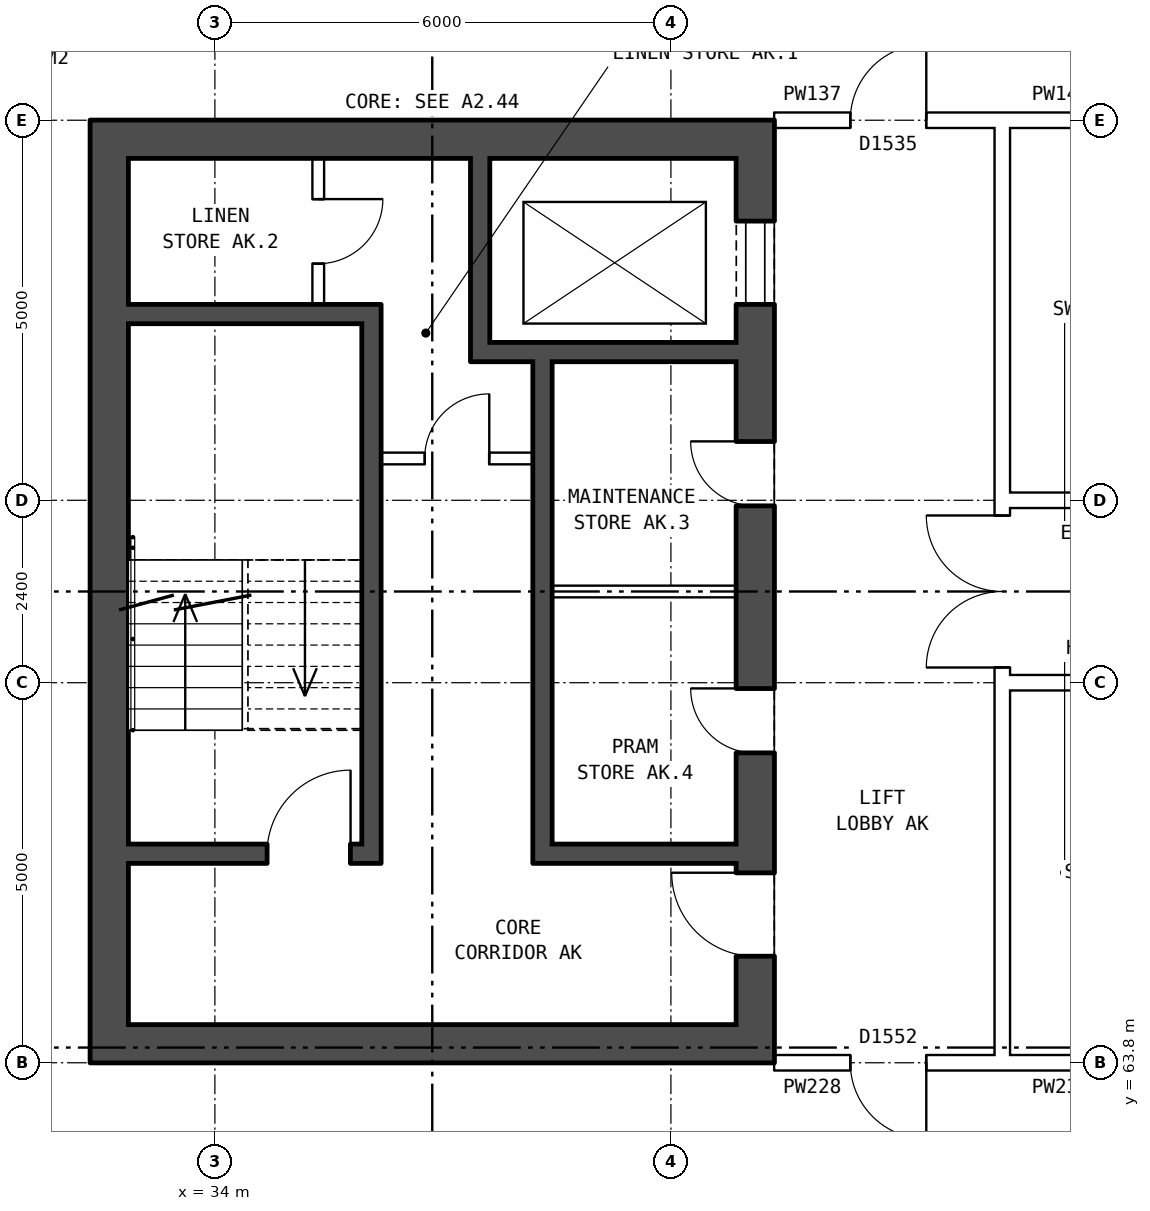
"""IFC4 building model, lengths in metres.
Left out: names, types, materials, properties, quantities, classifications, styles, units other than length and angle.
Written with IfcOpenShell. Run it as: python <this file> out.ifc"""

import sys

from ifc_helpers import new_model, si_unit, direction, frame, frame_2d, origin, place, context, subcontext, project, spatial, rectangle, extrude, element, fill, save


model = new_model("IFC4")
c1 = context("Model", 3, precision=1e-05, world=origin(), true_north=direction((0.0, 1.0)))
c2 = subcontext(c1, "Body", "Model", "MODEL_VIEW")
j1 = project(units=[si_unit("LENGTHUNIT", "METRE"), si_unit("PLANEANGLEUNIT", "RADIAN")], contexts=[c1])
p1 = place(None, origin())
s1 = spatial("IfcSite", under=j1, at=p1, CompositionType="ELEMENT")
p2 = place(p1, origin())
s2 = spatial("IfcBuilding", under=s1, at=p2, CompositionType="ELEMENT")
p3 = place(p2, frame((0.0, 0.0, 154.7)))
s3 = spatial("IfcBuildingStorey", under=s2, at=p3, CompositionType="ELEMENT", Elevation=154.7)
p4 = place(p3, frame((41.11, 76.2, 0.0), z_axis=(0.0, 0.0, 1.0), x_axis=(0.0, -1.0, 0.0)))
e1 = element("IfcWall", 1, at=p4, inside=s3, PredefinedType="SHEAR", context=c2, shape_type="SweptSolid", body=[
    extrude(rectangle(XDim=12.4, YDim=0.5, at=frame_2d((6.2, 0.0))), origin(), (0.0, 0.0, 1.0), 2.85),
])
p5 = place(p4, frame((1.325, 0.0, 0.0)))
e2 = element("IfcOpeningElement", 2, at=p5, cuts=e1, PredefinedType="OPENING", context=c2, shape_type="SweptSolid", body=[
    extrude(rectangle(XDim=1.1, YDim=2.1, at=frame_2d((0.55, 1.05))), frame((0.0, 0.26, 0.0), z_axis=(0.0, -1.0, 0.0), x_axis=(1.0, 0.0, 0.0)), (0.0, 0.0, 1.0), 0.52),
])
p6 = place(p4, frame((4.225, 0.0, 0.0)))
e3 = element("IfcOpeningElement", 3, at=p6, cuts=e1, PredefinedType="OPENING", context=c2, shape_type="SweptSolid", body=[
    extrude(rectangle(XDim=0.85, YDim=2.1, at=frame_2d((0.425, 1.05))), frame((0.0, 0.26, 0.0), z_axis=(0.0, -1.0, 0.0), x_axis=(1.0, 0.0, 0.0)), (0.0, 0.0, 1.0), 0.52),
])
p7 = place(p4, frame((7.475, 0.0, 0.0)))
e4 = element("IfcOpeningElement", 4, at=p7, cuts=e1, PredefinedType="OPENING", context=c2, shape_type="SweptSolid", body=[
    extrude(rectangle(XDim=0.85, YDim=2.1, at=frame_2d((0.425, 1.05))), frame((0.0, 0.26, 0.0), z_axis=(0.0, -1.0, 0.0), x_axis=(1.0, 0.0, 0.0)), (0.0, 0.0, 1.0), 0.52),
])
p8 = place(p4, frame((9.9, 0.0, 0.0)))
e5 = element("IfcOpeningElement", 5, at=p8, cuts=e1, PredefinedType="OPENING", context=c2, shape_type="SweptSolid", body=[
    extrude(rectangle(XDim=1.1, YDim=2.1, at=frame_2d((0.55, 1.05))), frame((0.0, 0.26, 0.0), z_axis=(0.0, -1.0, 0.0), x_axis=(1.0, 0.0, 0.0)), (0.0, 0.0, 1.0), 0.52),
])
p9 = place(p3, frame((32.61, 76.2, 0.0), z_axis=(0.0, 0.0, 1.0), x_axis=(0.0, -1.0, 0.0)))
e6 = element("IfcWall", 6, at=p9, inside=s3, PredefinedType="SHEAR", context=c2, shape_type="SweptSolid", body=[
    extrude(rectangle(XDim=12.4, YDim=0.5, at=frame_2d((6.2, 0.0))), origin(), (0.0, 0.0, 1.0), 2.85),
])
for number, where, z_axis, x_axis in (
    (7, (40.86, 75.95, 0.0), (0.0, 0.0, 1.0), (-1.0, 0.0, 0.0)),
    (8, (40.86, 64.05, 0.0), (0.0, 0.0, 1.0), (-1.0, 0.0, 0.0)),
):
    element("IfcWall", number, at=place(p3, frame(where, z_axis=z_axis, x_axis=x_axis)), inside=s3, PredefinedType="SHEAR", context=c2, shape_type="SweptSolid", body=[
        extrude(rectangle(XDim=8.0, YDim=0.5, at=frame_2d((4.0, 0.0))), origin(), (0.0, 0.0, 1.0), 2.85),
    ])
p10 = place(p3, frame((35.935, 73.65, 0.0), z_axis=(0.0, 0.0, 1.0), x_axis=(-1.0, 0.0, 0.0)))
e9 = element("IfcWall", 9, at=p10, inside=s3, PredefinedType="SHEAR", context=c2, shape_type="SweptSolid", body=[
    extrude(rectangle(XDim=3.075, YDim=0.25, at=frame_2d((1.538, 0.0))), origin(), (0.0, 0.0, 1.0), 2.85),
])
p11 = place(p3, frame((40.86, 73.15, 0.0), z_axis=(0.0, 0.0, 1.0), x_axis=(-1.0, 0.0, 0.0)))
e10 = element("IfcWall", 10, at=p11, inside=s3, PredefinedType="SHEAR", context=c2, shape_type="SweptSolid", body=[
    extrude(rectangle(XDim=3.495, YDim=0.25, at=frame_2d((1.748, 0.0))), origin(), (0.0, 0.0, 1.0), 2.85),
])
p12 = place(p3, frame((38.185, 71.75, 0.0), z_axis=(0.0, 0.0, 1.0), x_axis=(-1.0, 0.0, 0.0)))
e11 = element("IfcWall", 11, at=p12, inside=s3, PredefinedType="PARTITIONING", context=c2, shape_type="SweptSolid", body=[
    extrude(rectangle(XDim=2.0, YDim=0.15, at=frame_2d((1.0, 0.0))), origin(), (0.0, 0.0, 1.0), 2.85),
])
p13 = place(p12, frame((0.575, 0.0, 0.0)))
e12 = element("IfcOpeningElement", 12, at=p13, cuts=e11, PredefinedType="OPENING", context=c2, shape_type="SweptSolid", body=[
    extrude(rectangle(XDim=0.85, YDim=2.1, at=frame_2d((0.425, 1.05))), frame((0.0, 0.085, 0.0), z_axis=(0.0, -1.0, 0.0), x_axis=(1.0, 0.0, 0.0)), (0.0, 0.0, 1.0), 0.17),
])
p14 = place(p3, frame((40.86, 70.0, 0.0), z_axis=(0.0, 0.0, 1.0), x_axis=(-1.0, 0.0, 0.0)))
e13 = element("IfcWall", 13, at=p14, inside=s3, PredefinedType="PARTITIONING", context=c2, shape_type="SweptSolid", body=[
    extrude(rectangle(XDim=2.425, YDim=0.15, at=frame_2d((1.212, 0.0))), origin(), (0.0, 0.0, 1.0), 2.85),
])
p15 = place(p3, frame((40.86, 66.55, 0.0), z_axis=(0.0, 0.0, 1.0), x_axis=(-1.0, 0.0, 0.0)))
e14 = element("IfcWall", 14, at=p15, inside=s3, PredefinedType="SHEAR", context=c2, shape_type="SweptSolid", body=[
    extrude(rectangle(XDim=2.425, YDim=0.25, at=frame_2d((1.212, 0.0))), origin(), (0.0, 0.0, 1.0), 2.85),
])
p16 = place(p3, frame((35.935, 66.55, 0.0), z_axis=(0.0, 0.0, 1.0), x_axis=(-1.0, 0.0, 0.0)))
e15 = element("IfcWall", 15, at=p16, inside=s3, PredefinedType="SHEAR", context=c2, shape_type="SweptSolid", body=[
    extrude(rectangle(XDim=3.075, YDim=0.25, at=frame_2d((1.538, 0.0))), origin(), (0.0, 0.0, 1.0), 2.85),
])
p17 = place(p16, frame((0.15, 0.0, 0.0)))
e16 = element("IfcOpeningElement", 16, at=p17, cuts=e15, PredefinedType="OPENING", context=c2, shape_type="SweptSolid", body=[
    extrude(rectangle(XDim=1.1, YDim=2.1, at=frame_2d((0.55, 1.05))), frame((0.0, 0.135, 0.0), z_axis=(0.0, -1.0, 0.0), x_axis=(1.0, 0.0, 0.0)), (0.0, 0.0, 1.0), 0.27),
])
p18 = place(p3, frame((38.31, 73.025, 0.0), z_axis=(0.0, 0.0, 1.0), x_axis=(0.0, -1.0, 0.0)))
e17 = element("IfcWall", 17, at=p18, inside=s3, PredefinedType="SHEAR", context=c2, shape_type="SweptSolid", body=[
    extrude(rectangle(XDim=6.6, YDim=0.25, at=frame_2d((3.3, 0.0))), origin(), (0.0, 0.0, 1.0), 2.85),
])
p19 = place(p3, frame((37.49, 75.7, 0.0), z_axis=(0.0, 0.0, 1.0), x_axis=(0.0, -1.0, 0.0)))
e18 = element("IfcWall", 18, at=p19, inside=s3, PredefinedType="SHEAR", context=c2, shape_type="SweptSolid", body=[
    extrude(rectangle(XDim=2.425, YDim=0.25, at=frame_2d((1.212, 0.0))), origin(), (0.0, 0.0, 1.0), 2.85),
])
p20 = place(p3, frame((36.06, 73.775, 0.0), z_axis=(0.0, 0.0, 1.0), x_axis=(0.0, -1.0, 0.0)))
e19 = element("IfcWall", 19, at=p20, inside=s3, PredefinedType="SHEAR", context=c2, shape_type="SweptSolid", body=[
    extrude(rectangle(XDim=7.35, YDim=0.25, at=frame_2d((3.675, 0.0))), origin(), (0.0, 0.0, 1.0), 2.85),
])
p21 = place(p3, frame((35.36, 75.7, 0.0), z_axis=(0.0, 0.0, 1.0), x_axis=(0.0, -1.0, 0.0)))
e20 = element("IfcWall", 20, at=p21, inside=s3, PredefinedType="PARTITIONING", context=c2, shape_type="SweptSolid", body=[
    extrude(rectangle(XDim=1.925, YDim=0.15, at=frame_2d((0.962, 0.0))), origin(), (0.0, 0.0, 1.0), 2.85),
])
p22 = place(p21, frame((0.538, 0.0, 0.0)))
e21 = element("IfcOpeningElement", 21, at=p22, cuts=e20, PredefinedType="OPENING", context=c2, shape_type="SweptSolid", body=[
    extrude(rectangle(XDim=0.85, YDim=2.1, at=frame_2d((0.425, 1.05))), frame((0.0, 0.085, 0.0), z_axis=(0.0, -1.0, 0.0), x_axis=(1.0, 0.0, 0.0)), (0.0, 0.0, 1.0), 0.17),
])
p23 = place(p3, frame((44.36, 63.9, 0.0), z_axis=(0.0, 0.0, 1.0), x_axis=(0.0, 1.0, 0.0)))
e22 = element("IfcWall", 22, at=p23, inside=s3, PredefinedType="PARTITIONING", context=c2, shape_type="SweptSolid", body=[
    extrude(rectangle(XDim=12.2, YDim=0.2, at=frame_2d((6.1, 0.0))), origin(), (0.0, 0.0, 1.0), 2.85),
])
p24 = place(p23, frame((5.1, 0.0, 0.0)))
e23 = element("IfcOpeningElement", 23, at=p24, cuts=e22, PredefinedType="OPENING", context=c2, shape_type="SweptSolid", body=[
    extrude(rectangle(XDim=2.0, YDim=2.1, at=frame_2d((1.0, 1.05))), frame((0.0, 0.11, 0.0), z_axis=(0.0, -1.0, 0.0), x_axis=(1.0, 0.0, 0.0)), (0.0, 0.0, 1.0), 0.22),
])
p25 = place(p3, frame((41.36, 63.8, 0.0), z_axis=(0.0, 0.0, 1.0), x_axis=(1.0, 0.0, 0.0)))
e24 = element("IfcWall", 24, at=p25, inside=s3, PredefinedType="PARTITIONING", context=c2, shape_type="SweptSolid", body=[
    extrude(rectangle(XDim=3.0, YDim=0.2, at=frame_2d((1.5, 0.0))), origin(), (0.0, 0.0, 1.0), 2.85),
])
p26 = place(p25, frame((1.0, 0.0, 0.0)))
e25 = element("IfcOpeningElement", 25, at=p26, cuts=e24, PredefinedType="OPENING", context=c2, shape_type="SweptSolid", body=[
    extrude(rectangle(XDim=1.0, YDim=2.1, at=frame_2d((0.5, 1.05))), frame((0.0, 0.11, 0.0), z_axis=(0.0, -1.0, 0.0), x_axis=(1.0, 0.0, 0.0)), (0.0, 0.0, 1.0), 0.22),
])
p27 = place(p3, frame((44.36, 63.8, 0.0), z_axis=(0.0, 0.0, 1.0), x_axis=(1.0, 0.0, 0.0)))
e26 = element("IfcWall", 26, at=p27, inside=s3, PredefinedType="PARTITIONING", context=c2, shape_type="SweptSolid", body=[
    extrude(rectangle(XDim=1.54, YDim=0.2, at=frame_2d((0.77, 0.0))), origin(), (0.0, 0.0, 1.0), 2.85),
])
p28 = place(p3, frame((44.36, 68.8, 0.0), z_axis=(0.0, 0.0, 1.0), x_axis=(1.0, 0.0, 0.0)))
e27 = element("IfcWall", 27, at=p28, inside=s3, PredefinedType="PARTITIONING", context=c2, shape_type="SweptSolid", body=[
    extrude(rectangle(XDim=19.28, YDim=0.2, at=frame_2d((9.64, 0.0))), origin(), (0.0, 0.0, 1.0), 2.85),
])
p29 = place(p28, frame((14.64, 0.0, 0.0)))
e28 = element("IfcOpeningElement", 28, at=p29, cuts=e27, PredefinedType="OPENING", context=c2, shape_type="SweptSolid", body=[
    extrude(rectangle(XDim=1.0, YDim=2.1, at=frame_2d((0.5, 1.05))), frame((0.0, 0.11, 0.0), z_axis=(0.0, -1.0, 0.0), x_axis=(1.0, 0.0, 0.0)), (0.0, 0.0, 1.0), 0.22),
])
p30 = place(p28, frame((5.64, 0.0, 0.0)))
e29 = element("IfcOpeningElement", 29, at=p30, cuts=e27, PredefinedType="OPENING", context=c2, shape_type="SweptSolid", body=[
    extrude(rectangle(XDim=1.0, YDim=2.1, at=frame_2d((0.5, 1.05))), frame((0.0, 0.11, 0.0), z_axis=(0.0, -1.0, 0.0), x_axis=(1.0, 0.0, 0.0)), (0.0, 0.0, 1.0), 0.22),
])
p31 = place(p3, frame((44.36, 71.2, 0.0), z_axis=(0.0, 0.0, 1.0), x_axis=(1.0, 0.0, 0.0)))
e30 = element("IfcWall", 30, at=p31, inside=s3, PredefinedType="PARTITIONING", context=c2, shape_type="SweptSolid", body=[
    extrude(rectangle(XDim=19.28, YDim=0.2, at=frame_2d((9.64, 0.0))), origin(), (0.0, 0.0, 1.0), 2.85),
])
p32 = place(p31, frame((14.64, 0.0, 0.0)))
e31 = element("IfcOpeningElement", 31, at=p32, cuts=e30, PredefinedType="OPENING", context=c2, shape_type="SweptSolid", body=[
    extrude(rectangle(XDim=1.0, YDim=2.1, at=frame_2d((0.5, 1.05))), frame((0.0, 0.11, 0.0), z_axis=(0.0, -1.0, 0.0), x_axis=(1.0, 0.0, 0.0)), (0.0, 0.0, 1.0), 0.22),
])
p33 = place(p31, frame((5.64, 0.0, 0.0)))
e32 = element("IfcOpeningElement", 32, at=p33, cuts=e30, PredefinedType="OPENING", context=c2, shape_type="SweptSolid", body=[
    extrude(rectangle(XDim=1.0, YDim=2.1, at=frame_2d((0.5, 1.05))), frame((0.0, 0.11, 0.0), z_axis=(0.0, -1.0, 0.0), x_axis=(1.0, 0.0, 0.0)), (0.0, 0.0, 1.0), 0.22),
])
p34 = place(p3, frame((41.36, 76.2, 0.0), z_axis=(0.0, 0.0, 1.0), x_axis=(1.0, 0.0, 0.0)))
e33 = element("IfcWall", 33, at=p34, inside=s3, PredefinedType="PARTITIONING", context=c2, shape_type="SweptSolid", body=[
    extrude(rectangle(XDim=3.0, YDim=0.2, at=frame_2d((1.5, 0.0))), origin(), (0.0, 0.0, 1.0), 2.85),
])
p35 = place(p34, frame((1.0, 0.0, 0.0)))
e34 = element("IfcOpeningElement", 34, at=p35, cuts=e33, PredefinedType="OPENING", context=c2, shape_type="SweptSolid", body=[
    extrude(rectangle(XDim=1.0, YDim=2.1, at=frame_2d((0.5, 1.05))), frame((0.0, 0.11, 0.0), z_axis=(0.0, -1.0, 0.0), x_axis=(1.0, 0.0, 0.0)), (0.0, 0.0, 1.0), 0.22),
])
p36 = place(p3, frame((44.36, 76.2, 0.0), z_axis=(0.0, 0.0, 1.0), x_axis=(1.0, 0.0, 0.0)))
e35 = element("IfcWall", 35, at=p36, inside=s3, PredefinedType="PARTITIONING", context=c2, shape_type="SweptSolid", body=[
    extrude(rectangle(XDim=1.54, YDim=0.2, at=frame_2d((0.77, 0.0))), origin(), (0.0, 0.0, 1.0), 2.85),
])
p37 = place(p5, origin())
e36 = element("IfcDoor", 36, at=p37, inside=s3, OperationType="DOUBLE_DOOR_SLIDING", PredefinedType="DOOR", context=c2, shape_type="SweptSolid", body=[
    extrude(rectangle(XDim=1.1, YDim=2.1, at=frame_2d((0.55, 1.05))), frame((0.0, -0.185, 0.0), z_axis=(0.0, -1.0, 0.0), x_axis=(1.0, 0.0, 0.0)), (0.0, 0.0, 1.0), 0.05),
])
fill(e2, e36)
p38 = place(p6, frame((0.85, 0.0, 0.0), z_axis=(0.0, 0.0, 1.0), x_axis=(-1.0, 0.0, 0.0)))
e37 = element("IfcDoor", 37, at=p38, inside=s3, OperationType="SINGLE_SWING_RIGHT", PredefinedType="DOOR", context=c2, shape_type="SweptSolid", body=[
    extrude(rectangle(XDim=0.85, YDim=2.1, at=frame_2d((0.425, 1.05))), frame((0.0, 0.235, 0.0), z_axis=(0.0, -1.0, 0.0), x_axis=(1.0, 0.0, 0.0)), (0.0, 0.0, 1.0), 0.05),
])
fill(e3, e37)
p39 = place(p7, frame((0.85, 0.0, 0.0), z_axis=(0.0, 0.0, 1.0), x_axis=(-1.0, 0.0, 0.0)))
e38 = element("IfcDoor", 38, at=p39, inside=s3, OperationType="SINGLE_SWING_RIGHT", PredefinedType="DOOR", context=c2, shape_type="SweptSolid", body=[
    extrude(rectangle(XDim=0.85, YDim=2.1, at=frame_2d((0.425, 1.05))), frame((0.0, 0.235, 0.0), z_axis=(0.0, -1.0, 0.0), x_axis=(1.0, 0.0, 0.0)), (0.0, 0.0, 1.0), 0.05),
])
fill(e4, e38)
p40 = place(p8, frame((1.1, 0.0, 0.0), z_axis=(0.0, 0.0, 1.0), x_axis=(-1.0, 0.0, 0.0)))
e39 = element("IfcDoor", 39, at=p40, inside=s3, OperationType="SINGLE_SWING_RIGHT", PredefinedType="DOOR", context=c2, shape_type="SweptSolid", body=[
    extrude(rectangle(XDim=1.1, YDim=2.1, at=frame_2d((0.55, 1.05))), frame((0.0, 0.235, 0.0), z_axis=(0.0, -1.0, 0.0), x_axis=(1.0, 0.0, 0.0)), (0.0, 0.0, 1.0), 0.05),
])
fill(e5, e39)
p41 = place(p17, frame((1.1, 0.0, 0.0), z_axis=(0.0, 0.0, 1.0), x_axis=(-1.0, 0.0, 0.0)))
e40 = element("IfcDoor", 40, at=p41, inside=s3, OperationType="SINGLE_SWING_RIGHT", PredefinedType="DOOR", context=c2, shape_type="SweptSolid", body=[
    extrude(rectangle(XDim=1.1, YDim=2.1, at=frame_2d((0.55, 1.05))), frame((0.0, 0.025, 0.0), z_axis=(0.0, -1.0, 0.0), x_axis=(1.0, 0.0, 0.0)), (0.0, 0.0, 1.0), 0.05),
])
fill(e16, e40)
p42 = place(p13, frame((0.85, 0.0, 0.0), z_axis=(0.0, 0.0, 1.0), x_axis=(-1.0, 0.0, 0.0)))
e41 = element("IfcDoor", 41, at=p42, inside=s3, OperationType="SINGLE_SWING_RIGHT", PredefinedType="DOOR", context=c2, shape_type="SweptSolid", body=[
    extrude(rectangle(XDim=0.85, YDim=2.1, at=frame_2d((0.425, 1.05))), frame((0.0, 0.025, 0.0), z_axis=(0.0, -1.0, 0.0), x_axis=(1.0, 0.0, 0.0)), (0.0, 0.0, 1.0), 0.05),
])
fill(e12, e41)
p43 = place(p22, origin())
e42 = element("IfcDoor", 42, at=p43, inside=s3, OperationType="SINGLE_SWING_LEFT", PredefinedType="DOOR", context=c2, shape_type="SweptSolid", body=[
    extrude(rectangle(XDim=0.85, YDim=2.1, at=frame_2d((0.425, 1.05))), frame((0.0, 0.025, 0.0), z_axis=(0.0, -1.0, 0.0), x_axis=(1.0, 0.0, 0.0)), (0.0, 0.0, 1.0), 0.05),
])
fill(e21, e42)
p44 = place(p24, origin())
e43 = element("IfcDoor", 43, at=p44, inside=s3, OperationType="DOUBLE_DOOR_SINGLE_SWING", PredefinedType="DOOR", context=c2, shape_type="SweptSolid", body=[
    extrude(rectangle(XDim=2.0, YDim=2.1, at=frame_2d((1.0, 1.05))), frame((0.0, 0.025, 0.0), z_axis=(0.0, -1.0, 0.0), x_axis=(1.0, 0.0, 0.0)), (0.0, 0.0, 1.0), 0.05),
])
fill(e23, e43)
p45 = place(p26, frame((1.0, 0.0, 0.0), z_axis=(0.0, 0.0, 1.0), x_axis=(-1.0, 0.0, 0.0)))
e44 = element("IfcDoor", 44, at=p45, inside=s3, OperationType="SINGLE_SWING_LEFT", PredefinedType="DOOR", context=c2, shape_type="SweptSolid", body=[
    extrude(rectangle(XDim=1.0, YDim=2.1, at=frame_2d((0.5, 1.05))), frame((0.0, 0.025, 0.0), z_axis=(0.0, -1.0, 0.0), x_axis=(1.0, 0.0, 0.0)), (0.0, 0.0, 1.0), 0.05),
])
fill(e25, e44)
p46 = place(p35, origin())
e45 = element("IfcDoor", 45, at=p46, inside=s3, OperationType="SINGLE_SWING_RIGHT", PredefinedType="DOOR", context=c2, shape_type="SweptSolid", body=[
    extrude(rectangle(XDim=1.0, YDim=2.1, at=frame_2d((0.5, 1.05))), frame((0.0, 0.025, 0.0), z_axis=(0.0, -1.0, 0.0), x_axis=(1.0, 0.0, 0.0)), (0.0, 0.0, 1.0), 0.05),
])
fill(e34, e45)
save(model, sys.argv[1])
